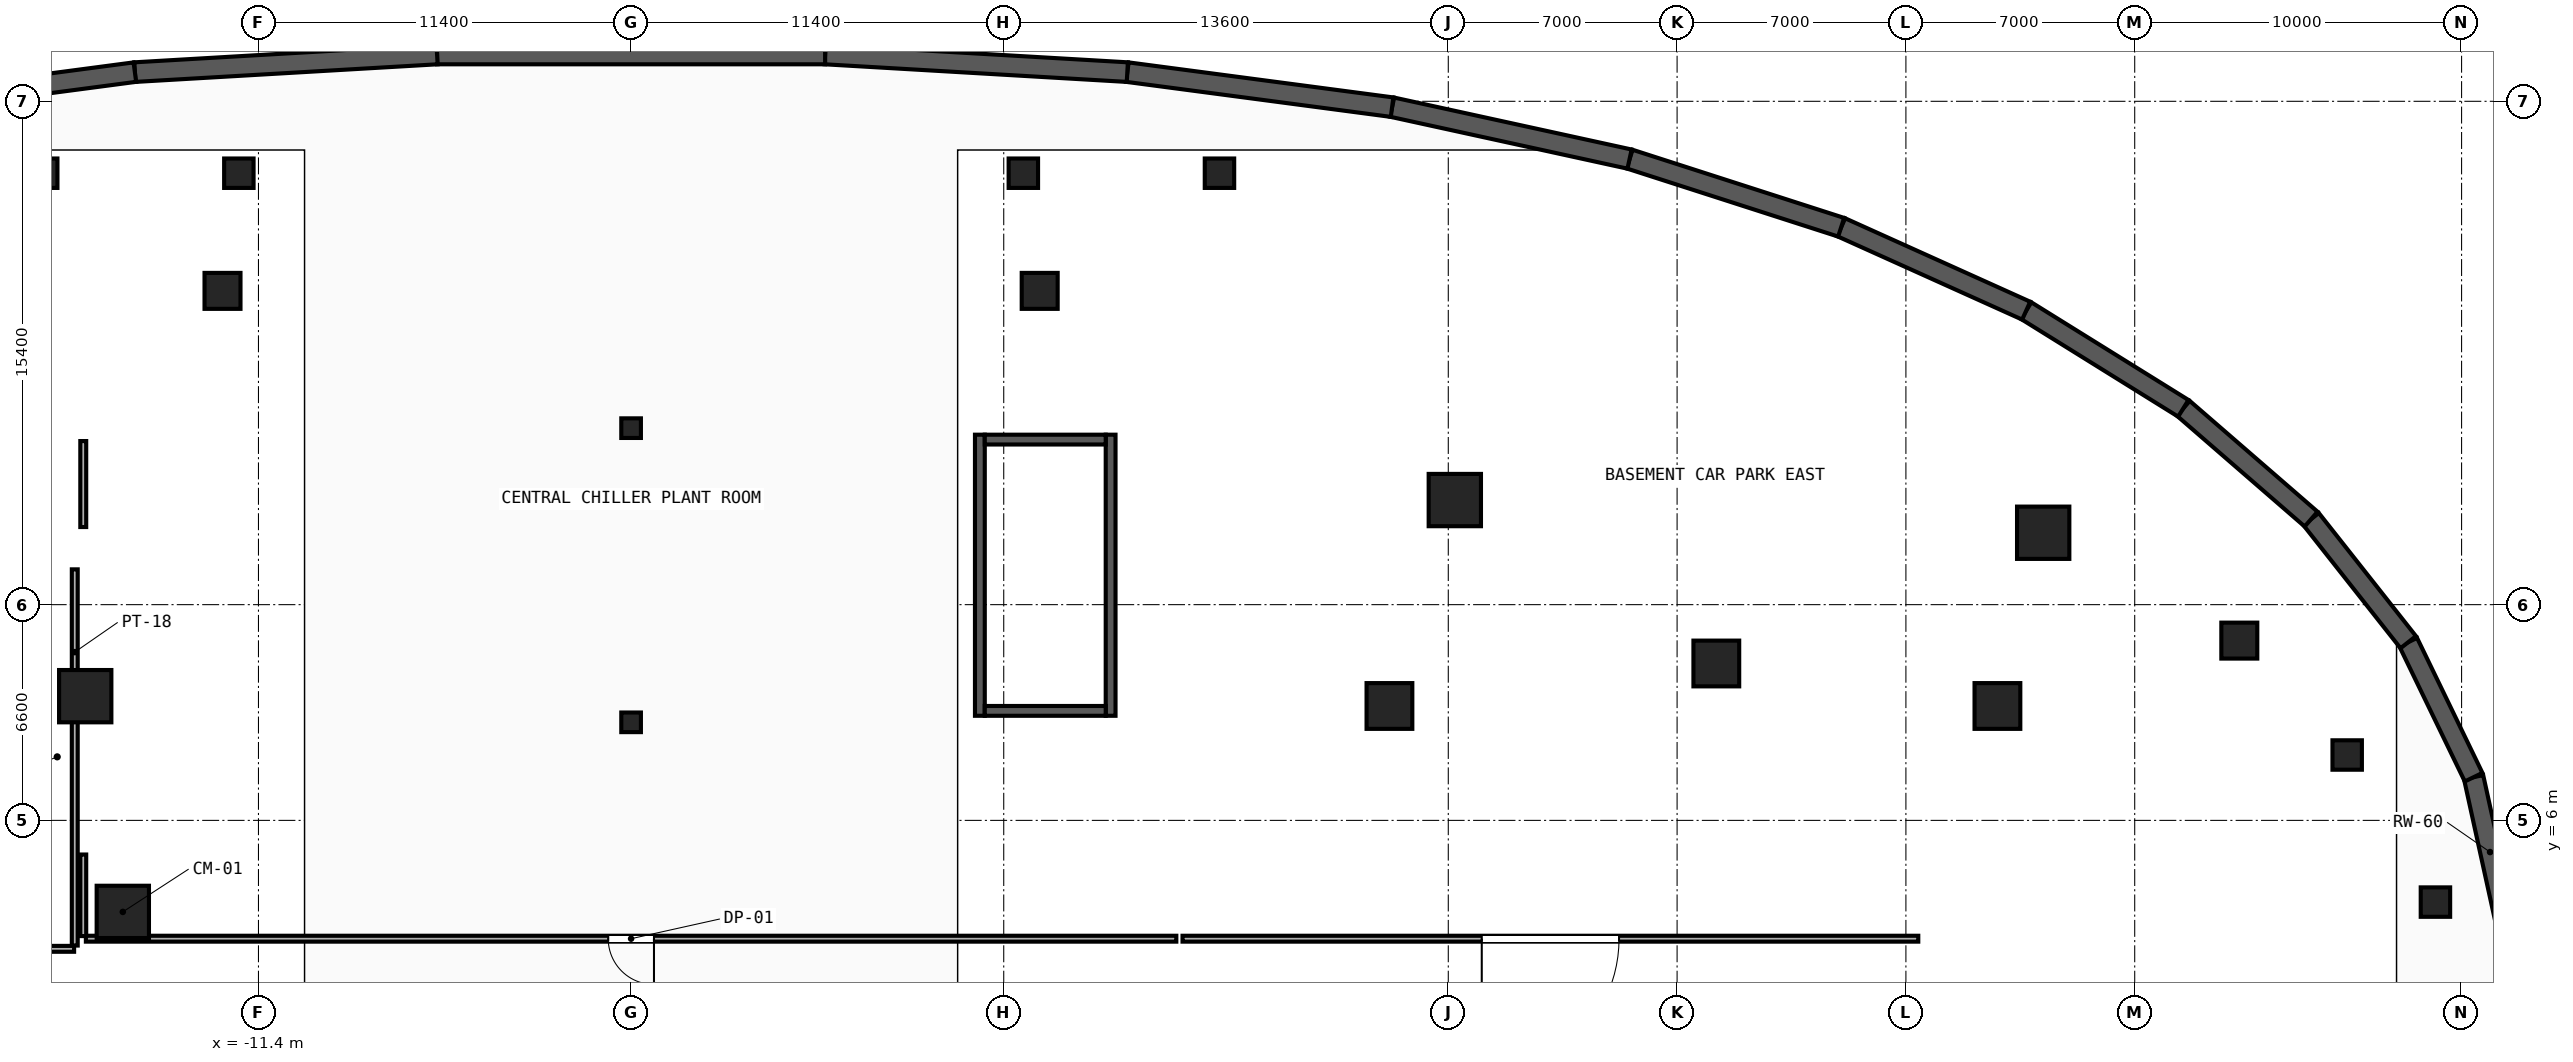
"""IFC4 building model, lengths in metres.
Left out: names, types, materials, properties, quantities, classifications, styles, units other than length and angle.
Written with IfcOpenShell. Run it as: python <this file> out.ifc"""

import sys

from ifc_helpers import new_model, si_unit, direction, frame, frame_2d, origin, origin_2d, place, context, subcontext, project, spatial, rectangle, hollow_rectangle, circle, extrude, element, fill, save


model = new_model("IFC4")
c1 = context("Model", 3, precision=1e-05, world=origin(), true_north=direction((0.0, 1.0)))
c2 = subcontext(c1, "Body", "Model", "MODEL_VIEW")
j1 = project(units=[si_unit("LENGTHUNIT", "METRE"), si_unit("PLANEANGLEUNIT", "RADIAN")], contexts=[c1])
p1 = place(None, origin())
s1 = spatial("IfcSite", under=j1, at=p1, CompositionType="ELEMENT")
p2 = place(p1, origin())
s2 = spatial("IfcBuilding", under=s1, at=p2, CompositionType="ELEMENT")
p3 = place(p2, frame((0.0, 0.0, -9.0)))
s3 = spatial("IfcBuildingStorey", under=s2, at=p3, CompositionType="ELEMENT", Elevation=-9.0)
for number, where, z_axis, x_axis in (
    (1, (41.8, 9.5, 0.0), (0.0, 0.0, 1.0), (1.0, 0.0, 0.0)),
    (2, (33.2, 10.8, 0.0), (0.0, 0.0, 1.0), (1.0, 0.0, 0.0)),
    (3, (23.2, 9.5, 0.0), (0.0, 0.0, 1.0), (1.0, 0.0, 0.0)),
):
    element("IfcColumn", number, at=place(p3, frame(where, z_axis=z_axis, x_axis=x_axis)), inside=s3, PredefinedType="COLUMN", context=c2, shape_type="SweptSolid", body=[
        extrude(rectangle(XDim=1.4, YDim=1.4, at=origin_2d()), origin(), (0.0, 0.0, 1.0), 4.5),
    ])
for number, where, z_axis, x_axis in (
    (4, (-15.55, 3.2, 0.0), (0.0, 0.0, 1.0), (1.0, 0.0, 0.0)),
    (5, (-16.7, 9.8, 0.0), (0.0, 0.0, 1.0), (1.0, 0.0, 0.0)),
    (6, (43.2, 14.8, 0.0), (0.0, 0.0, 1.0), (1.0, 0.0, 0.0)),
    (7, (25.2, 15.8, 0.0), (0.0, 0.0, 1.0), (1.0, 0.0, 0.0)),
):
    element("IfcColumn", number, at=place(p3, frame(where, z_axis=z_axis, x_axis=x_axis)), inside=s3, PredefinedType="COLUMN", context=c2, shape_type="SweptSolid", body=[
        extrude(rectangle(XDim=1.6, YDim=1.6, at=origin_2d()), origin(), (0.0, 0.0, 1.0), 4.5),
    ])
for number, where, z_axis, x_axis in (
    (8, (0.0, 9.0, 0.0), (0.0, 0.0, 1.0), (1.0, 0.0, 0.0)),
    (9, (0.0, 18.0, 0.0), (0.0, 0.0, 1.0), (1.0, 0.0, 0.0)),
):
    element("IfcColumn", number, at=place(p3, frame(where, z_axis=z_axis, x_axis=x_axis)), inside=s3, PredefinedType="COLUMN", context=c2, shape_type="SweptSolid", body=[
        extrude(hollow_rectangle(XDim=0.6, YDim=0.6, WallThickness=0.032, at=origin_2d()), origin(), (0.0, 0.0, 1.0), 4.5),
    ])
for number, where, z_axis, x_axis in (
    (10, (-12.5, 22.2, 0.0), (0.0, 0.0, 1.0), (1.0, 0.0, 0.0)),
    (11, (12.5, 22.2, 0.0), (0.0, 0.0, 1.0), (1.0, 0.0, 0.0)),
    (12, (49.2, 11.5, 0.0), (0.0, 0.0, 1.0), (1.0, 0.0, 0.0)),
):
    element("IfcColumn", number, at=place(p3, frame(where, z_axis=z_axis, x_axis=x_axis)), inside=s3, PredefinedType="PILASTER", context=c2, shape_type="SweptSolid", body=[
        extrude(circle(Radius=0.55, at=origin_2d()), origin(), (0.0, 0.0, 1.0), 4.5),
    ])
for number, where, z_axis, x_axis in (
    (13, (52.5, 8.0, 0.0), (0.0, 0.0, 1.0), (1.0, 0.0, 0.0)),
    (14, (55.2, 3.5, 0.0), (0.0, 0.0, 1.0), (1.0, 0.0, 0.0)),
    (15, (-18.0, 25.8, 0.0), (0.0, 0.0, 1.0), (1.0, 0.0, 0.0)),
    (16, (-12.0, 25.8, 0.0), (0.0, 0.0, 1.0), (1.0, 0.0, 0.0)),
    (17, (12.0, 25.8, 0.0), (0.0, 0.0, 1.0), (1.0, 0.0, 0.0)),
    (18, (18.0, 25.8, 0.0), (0.0, 0.0, 1.0), (1.0, 0.0, 0.0)),
):
    element("IfcColumn", number, at=place(p3, frame(where, z_axis=z_axis, x_axis=x_axis)), inside=s3, PredefinedType="COLUMN", context=c2, shape_type="SweptSolid", body=[
        extrude(rectangle(XDim=0.9, YDim=0.9, at=origin_2d()), origin(), (0.0, 0.0, 1.0), 4.5),
    ])
p4 = place(p3, frame((57.374, 2.74, 0.0), z_axis=(0.0, 0.0, 1.0), x_axis=(-0.214510247434, 0.976721738135, 0.0)))
e19 = element("IfcWall", 19, at=p4, inside=s3, PredefinedType="USERDEFINED", context=c2, shape_type="SweptSolid", body=[
    extrude(rectangle(XDim=4.69, YDim=0.6, at=frame_2d((2.345, 0.0))), origin(), (0.0, 0.0, 1.0), 4.15),
])
p5 = place(p3, frame((56.368, 7.321, 0.0), z_axis=(0.0, 0.0, 1.0), x_axis=(-0.435772260249, 0.900056963307, 0.0)))
e20 = element("IfcWall", 20, at=p5, inside=s3, PredefinedType="USERDEFINED", context=c2, shape_type="SweptSolid", body=[
    extrude(rectangle(XDim=4.59, YDim=0.6, at=frame_2d((2.295, 0.0))), origin(), (0.0, 0.0, 1.0), 4.15),
])
p6 = place(p3, frame((54.368, 11.452, 0.0), z_axis=(0.0, 0.0, 1.0), x_axis=(-0.619447864054, 0.785037797637, 0.0)))
e21 = element("IfcWall", 21, at=p6, inside=s3, PredefinedType="USERDEFINED", context=c2, shape_type="SweptSolid", body=[
    extrude(rectangle(XDim=4.796, YDim=0.6, at=frame_2d((2.398, 0.0))), origin(), (0.0, 0.0, 1.0), 4.15),
])
p7 = place(p3, frame((51.397, 15.217, 0.0), z_axis=(0.0, 0.0, 1.0), x_axis=(-0.755564536906, 0.655074217605, 0.0)))
e22 = element("IfcWall", 22, at=p7, inside=s3, PredefinedType="USERDEFINED", context=c2, shape_type="SweptSolid", body=[
    extrude(rectangle(XDim=5.175, YDim=0.6, at=frame_2d((2.587, 0.0))), origin(), (0.0, 0.0, 1.0), 4.15),
])
p8 = place(p3, frame((47.487, 18.607, 0.0), z_axis=(0.0, 0.0, 1.0), x_axis=(-0.849299437699, 0.527911417877, 0.0)))
e23 = element("IfcWall", 23, at=p8, inside=s3, PredefinedType="USERDEFINED", context=c2, shape_type="SweptSolid", body=[
    extrude(rectangle(XDim=5.66, YDim=0.6, at=frame_2d((2.83, 0.0))), origin(), (0.0, 0.0, 1.0), 4.15),
])
p9 = place(p3, frame((42.68, 21.595, 0.0), z_axis=(0.0, 0.0, 1.0), x_axis=(-0.911643952457, 0.410980904603, 0.0)))
e24 = element("IfcWall", 24, at=p9, inside=s3, PredefinedType="USERDEFINED", context=c2, shape_type="SweptSolid", body=[
    extrude(rectangle(XDim=6.209, YDim=0.6, at=frame_2d((3.105, 0.0))), origin(), (0.0, 0.0, 1.0), 4.15),
])
p10 = place(p3, frame((37.019, 24.147, 0.0), z_axis=(0.0, 0.0, 1.0), x_axis=(-0.951843868052, 0.306583187492, 0.0)))
e25 = element("IfcWall", 25, at=p10, inside=s3, PredefinedType="USERDEFINED", context=c2, shape_type="SweptSolid", body=[
    extrude(rectangle(XDim=6.801, YDim=0.6, at=frame_2d((3.4, 0.0))), origin(), (0.0, 0.0, 1.0), 4.15),
])
p11 = place(p3, frame((30.546, 26.232, 0.0), z_axis=(0.0, 0.0, 1.0), x_axis=(-0.976902373216, 0.213686109059, 0.0)))
e26 = element("IfcWall", 26, at=p11, inside=s3, PredefinedType="USERDEFINED", context=c2, shape_type="SweptSolid", body=[
    extrude(rectangle(XDim=7.437, YDim=0.6, at=frame_2d((3.718, 0.0))), origin(), (0.0, 0.0, 1.0), 4.15),
])
p12 = place(p3, frame((23.281, 27.821, 0.0), z_axis=(0.0, 0.0, 1.0), x_axis=(-0.991355566156, 0.131202673187, 0.0)))
e27 = element("IfcWall", 27, at=p12, inside=s3, PredefinedType="USERDEFINED", context=c2, shape_type="SweptSolid", body=[
    extrude(rectangle(XDim=8.171, YDim=0.6, at=frame_2d((4.085, 0.0))), origin(), (0.0, 0.0, 1.0), 4.15),
])
p13 = place(p3, frame((15.181, 28.893, 0.0), z_axis=(0.0, 0.0, 1.0), x_axis=(-0.998305864477, 0.058184198455, 0.0)))
e28 = element("IfcWall", 28, at=p13, inside=s3, PredefinedType="USERDEFINED", context=c2, shape_type="SweptSolid", body=[
    extrude(rectangle(XDim=9.26, YDim=0.6, at=frame_2d((4.63, 0.0))), origin(), (0.0, 0.0, 1.0), 4.15),
])
p14 = place(p3, frame((5.936, 29.432, 0.0), z_axis=(0.0, 0.0, 1.0), x_axis=(-1.0, 0.0, 0.0)))
e29 = element("IfcWall", 29, at=p14, inside=s3, PredefinedType="USERDEFINED", context=c2, shape_type="SweptSolid", body=[
    extrude(rectangle(XDim=11.872, YDim=0.6, at=frame_2d((5.936, 0.0))), origin(), (0.0, 0.0, 1.0), 4.15),
])
p15 = place(p3, frame((-5.936, 29.432, 0.0), z_axis=(0.0, 0.0, 1.0), x_axis=(-0.998305864477, -0.058184198455, 0.0)))
e30 = element("IfcWall", 30, at=p15, inside=s3, PredefinedType="USERDEFINED", context=c2, shape_type="SweptSolid", body=[
    extrude(rectangle(XDim=9.26, YDim=0.6, at=frame_2d((4.63, 0.0))), origin(), (0.0, 0.0, 1.0), 4.15),
])
p16 = place(p3, frame((-15.181, 28.893, 0.0), z_axis=(0.0, 0.0, 1.0), x_axis=(-0.991355566156, -0.131202673187, 0.0)))
e31 = element("IfcWall", 31, at=p16, inside=s3, PredefinedType="USERDEFINED", context=c2, shape_type="SweptSolid", body=[
    extrude(rectangle(XDim=8.171, YDim=0.6, at=frame_2d((4.085, 0.0))), origin(), (0.0, 0.0, 1.0), 4.15),
])
for number, where, z_axis, x_axis in (
    (32, (10.67, 9.2, 0.0), (0.0, 0.0, 1.0), (0.0, 1.0, 0.0)),
    (33, (14.67, 9.2, 0.0), (0.0, 0.0, 1.0), (0.0, 1.0, 0.0)),
):
    element("IfcWall", number, at=place(p3, frame(where, z_axis=z_axis, x_axis=x_axis)), inside=s3, PredefinedType="SHEAR", context=c2, shape_type="SweptSolid", body=[
        extrude(rectangle(XDim=8.6, YDim=0.3, at=frame_2d((4.3, 0.0))), origin(), (0.0, 0.0, 1.0), 4.15),
    ])
for number, where, z_axis, x_axis in (
    (34, (10.82, 17.65, 0.0), (0.0, 0.0, 1.0), (1.0, 0.0, 0.0)),
    (35, (10.82, 9.35, 0.0), (0.0, 0.0, 1.0), (1.0, 0.0, 0.0)),
):
    element("IfcWall", number, at=place(p3, frame(where, z_axis=z_axis, x_axis=x_axis)), inside=s3, PredefinedType="SHEAR", context=c2, shape_type="SweptSolid", body=[
        extrude(rectangle(XDim=3.7, YDim=0.3, at=frame_2d((1.85, 0.0))), origin(), (0.0, 0.0, 1.0), 4.15),
    ])
p17 = place(p3, frame((-17.02, 2.17, 0.0), z_axis=(0.0, 0.0, 1.0), x_axis=(0.0, 1.0, 0.0)))
e36 = element("IfcWall", 36, at=p17, inside=s3, PredefinedType="PARTITIONING", context=c2, shape_type="SweptSolid", body=[
    extrude(rectangle(XDim=11.51, YDim=0.18, at=frame_2d((5.755, 0.0))), origin(), (0.0, 0.0, 1.0), 4.15),
])
p18 = place(p3, frame((-20.87, 2.07, 0.0), z_axis=(0.0, 0.0, 1.0), x_axis=(1.0, 0.0, 0.0)))
e37 = element("IfcWall", 37, at=p18, inside=s3, PredefinedType="PARTITIONING", context=c2, shape_type="SweptSolid", body=[
    extrude(rectangle(XDim=3.83, YDim=0.18, at=frame_2d((1.915, 0.0))), origin(), (0.0, 0.0, 1.0), 4.15),
])
p19 = place(p18, frame((1.44, 0.0, 0.0)))
e38 = element("IfcOpeningElement", 38, at=p19, cuts=e37, PredefinedType="OPENING", context=c2, shape_type="SweptSolid", body=[
    extrude(rectangle(XDim=0.95, YDim=2.1, at=frame_2d((0.475, 1.05))), frame((0.0, 0.1, 0.0), z_axis=(0.0, -1.0, 0.0), x_axis=(1.0, 0.0, 0.0)), (0.0, 0.0, 1.0), 0.2),
])
p20 = place(p3, frame((16.68, 2.38, 0.0), z_axis=(0.0, 0.0, 1.0), x_axis=(-1.0, 0.0, 0.0)))
e39 = element("IfcWall", 39, at=p20, inside=s3, PredefinedType="PARTITIONING", context=c2, shape_type="SweptSolid", body=[
    extrude(rectangle(XDim=33.36, YDim=0.18, at=frame_2d((16.68, 0.0))), origin(), (0.0, 0.0, 1.0), 3.377),
])
p21 = place(p20, frame((15.98, 0.0, 0.0)))
e40 = element("IfcOpeningElement", 40, at=p21, cuts=e39, PredefinedType="OPENING", context=c2, shape_type="SweptSolid", body=[
    extrude(rectangle(XDim=1.4, YDim=2.2, at=frame_2d((0.7, 1.1))), frame((0.0, 0.1, 0.0), z_axis=(0.0, -1.0, 0.0), x_axis=(1.0, 0.0, 0.0)), (0.0, 0.0, 1.0), 0.2),
])
p22 = place(p3, frame((-16.76, 14.975, 0.0), z_axis=(0.0, 0.0, 1.0), x_axis=(0.0, 1.0, 0.0)))
e41 = element("IfcWall", 41, at=p22, inside=s3, PredefinedType="PARTITIONING", context=c2, shape_type="SweptSolid", body=[
    extrude(rectangle(XDim=2.631, YDim=0.18, at=frame_2d((1.315, 0.0))), origin(), (0.0, 0.0, 1.0), 4.15),
])
p23 = place(p3, frame((-16.76, 2.46, 0.0), z_axis=(0.0, 0.0, 1.0), x_axis=(0.0, 1.0, 0.0)))
e42 = element("IfcWall", 42, at=p23, inside=s3, PredefinedType="PARTITIONING", context=c2, shape_type="SweptSolid", body=[
    extrude(rectangle(XDim=2.495, YDim=0.18, at=frame_2d((1.248, 0.0))), origin(), (0.0, 0.0, 1.0), 4.15),
])
p24 = place(p3, frame((39.378, 2.38, 0.0), z_axis=(0.0, 0.0, 1.0), x_axis=(-1.0, 0.0, 0.0)))
e43 = element("IfcWall", 43, at=p24, inside=s3, PredefinedType="PARTITIONING", context=c2, shape_type="SweptSolid", body=[
    extrude(rectangle(XDim=22.508, YDim=0.18, at=frame_2d((11.254, 0.0))), origin(), (0.0, 0.0, 1.0), 4.15),
])
p25 = place(p24, frame((9.154, 0.0, 0.0)))
e44 = element("IfcOpeningElement", 44, at=p25, cuts=e43, PredefinedType="OPENING", context=c2, shape_type="SweptSolid", body=[
    extrude(rectangle(XDim=4.2, YDim=2.8, at=frame_2d((2.1, 1.4))), frame((0.0, 0.1, 0.0), z_axis=(0.0, -1.0, 0.0), x_axis=(1.0, 0.0, 0.0)), (0.0, 0.0, 1.0), 0.2),
])
p26 = place(p21, origin())
e45 = element("IfcDoor", 45, at=p26, inside=s3, OperationType="SINGLE_SWING_LEFT", PredefinedType="DOOR", context=c2, shape_type="SweptSolid", body=[
    extrude(rectangle(XDim=1.4, YDim=2.2, at=frame_2d((0.7, 1.1))), frame((0.0, 0.025, 0.0), z_axis=(0.0, -1.0, 0.0), x_axis=(1.0, 0.0, 0.0)), (0.0, 0.0, 1.0), 0.05),
])
fill(e40, e45)
p27 = place(p25, origin())
e46 = element("IfcDoor", 46, at=p27, inside=s3, OperationType="SINGLE_SWING_RIGHT", PredefinedType="GATE", context=c2, shape_type="SweptSolid", body=[
    extrude(rectangle(XDim=4.2, YDim=2.8, at=frame_2d((2.1, 1.4))), frame((0.0, 0.025, 0.0), z_axis=(0.0, -1.0, 0.0), x_axis=(1.0, 0.0, 0.0)), (0.0, 0.0, 1.0), 0.05),
])
fill(e44, e46)
save(model, sys.argv[1])
